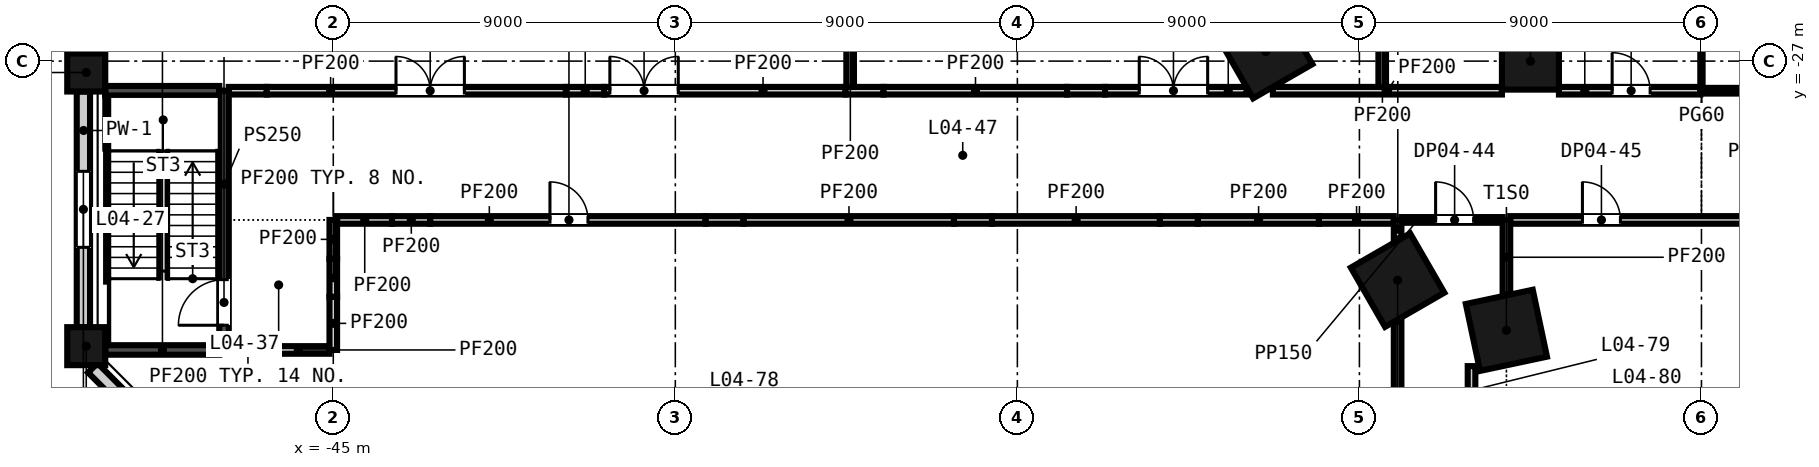
"""IFC4 building model, lengths in metres.
Left out: names, types, materials, properties, quantities, classifications, styles, units other than length and angle.
Written with IfcOpenShell. Run it as: python <this file> out.ifc"""

import sys

from ifc_helpers import new_model, si_unit, direction, frame, frame_2d, origin, origin_2d, place, context, subcontext, project, spatial, rectangle, extrude, element, fill, save


model = new_model("IFC4")
c1 = context("Model", 3, precision=1e-05, world=origin(), true_north=direction((0.0, 1.0)))
c2 = subcontext(c1, "Body", "Model", "MODEL_VIEW")
j1 = project(units=[si_unit("LENGTHUNIT", "METRE"), si_unit("PLANEANGLEUNIT", "RADIAN")], contexts=[c1])
p1 = place(None, origin())
s1 = spatial("IfcSite", under=j1, at=p1, CompositionType="ELEMENT")
p2 = place(p1, origin())
s2 = spatial("IfcBuilding", under=s1, at=p2, CompositionType="ELEMENT")
p3 = place(p2, frame((0.0, 0.0, 27.0)))
s3 = spatial("IfcBuildingStorey", under=s2, at=p3, CompositionType="ELEMENT", Elevation=27.0)
for number, where, z_axis, x_axis in (
    (1, (-20.467, -26.75, -0.3), (0.0, 0.0, 1.0), (0.5, -0.866, 0.0)),
    (2, (-16.995, -32.763, -0.3), (0.0, 0.0, 1.0), (0.5, -0.866, 0.0)),
    (3, (-14.132, -34.084, -0.3), (0.0, 0.0, 1.0), (0.978, 0.208, 0.0)),
):
    element("IfcColumn", number, at=place(p3, frame(where, z_axis=z_axis, x_axis=x_axis)), inside=s3, PredefinedType="COLUMN", context=c2, shape_type="SweptSolid", body=[
        extrude(rectangle(XDim=1.8, YDim=1.8, at=origin_2d()), origin(), (0.0, 0.0, 1.0), 4.5),
    ])
p4 = place(p3, frame((-13.5, -27.0, -0.3), z_axis=(0.0, 0.0, 1.0), x_axis=(1.0, 0.0, 0.0)))
e4 = element("IfcColumn", 4, at=p4, inside=s3, PredefinedType="COLUMN", context=c2, shape_type="SweptSolid", body=[
    extrude(rectangle(XDim=1.5, YDim=1.5, at=origin_2d()), origin(), (0.0, 0.0, 1.0), 4.5),
])
for number, where, z_axis, x_axis in (
    (5, (-51.5, -34.5, -0.3), (0.0, 0.0, 1.0), (0.0, -1.0, 0.0)),
    (6, (-51.5, -27.3, -0.3), (0.0, 0.0, 1.0), (0.0, 1.0, 0.0)),
):
    element("IfcColumn", number, at=place(p3, frame(where, z_axis=z_axis, x_axis=x_axis)), inside=s3, PredefinedType="COLUMN", context=c2, shape_type="SweptSolid", body=[
        extrude(rectangle(XDim=1.0, YDim=1.0, at=origin_2d()), origin(), (0.0, 0.0, 1.0), 4.5),
    ])
p5 = place(p3, frame((-51.575, -9.2, -0.3), z_axis=(0.0, 0.0, 1.0), x_axis=(0.0, -1.0, 0.0)))
e7 = element("IfcWall", 7, at=p5, inside=s3, PredefinedType="SOLIDWALL", context=c2, shape_type="SweptSolid", body=[
    extrude(rectangle(XDim=17.6, YDim=0.35, at=frame_2d((8.8, 0.0))), origin(), (0.0, 0.0, 1.0), 3.6),
])
p6 = place(p3, frame((-51.575, -27.8, -0.3), z_axis=(0.0, 0.0, 1.0), x_axis=(0.0, -1.0, 0.0)))
e8 = element("IfcWall", 8, at=p6, inside=s3, PredefinedType="SOLIDWALL", context=c2, shape_type="SweptSolid", body=[
    extrude(rectangle(XDim=6.2, YDim=0.35, at=frame_2d((3.1, 0.0))), origin(), (0.0, 0.0, 1.0), 3.6),
])
p7 = place(p6, frame((2.1, 0.0, 1.2)))
e9 = element("IfcOpeningElement", 9, at=p7, cuts=e8, PredefinedType="OPENING", context=c2, shape_type="SweptSolid", body=[
    extrude(rectangle(XDim=2.0, YDim=2.35, at=frame_2d((1.0, 1.175))), frame((0.0, 0.185, 0.0), z_axis=(0.0, -1.0, 0.0), x_axis=(1.0, 0.0, 0.0)), (0.0, 0.0, 1.0), 0.37),
])
p8 = place(p3, frame((-51.327, -35.072, -0.3), z_axis=(0.0, 0.0, 1.0), x_axis=(0.707106781187, -0.707106781187, 0.0)))
e10 = element("IfcWall", 10, at=p8, inside=s3, PredefinedType="SOLIDWALL", context=c2, shape_type="SweptSolid", body=[
    extrude(rectangle(XDim=7.433, YDim=0.35, at=frame_2d((3.716, 0.0))), origin(), (0.0, 0.0, 1.0), 3.6),
])
p9 = place(p3, frame((-51.0, -34.6, 0.0), z_axis=(0.0, 0.0, 1.0), x_axis=(1.0, 0.0, 0.0)))
e11 = element("IfcWall", 11, at=p9, inside=s3, PredefinedType="SHEAR", context=c2, shape_type="SweptSolid", body=[
    extrude(rectangle(XDim=3.0, YDim=0.25, at=frame_2d((1.5, 0.0))), origin(), (0.0, 0.0, 1.0), 4.2),
])
p10 = place(p3, frame((-47.75, -34.6, 0.0), z_axis=(0.0, 0.0, 1.0), x_axis=(1.0, 0.0, 0.0)))
e12 = element("IfcWall", 12, at=p10, inside=s3, PredefinedType="PARTITIONING", context=c2, shape_type="SweptSolid", body=[
    extrude(rectangle(XDim=1.0, YDim=0.2, at=frame_2d((0.5, 0.0))), origin(), (0.0, 0.0, 1.0), 3.111),
])
p11 = place(p3, frame((-46.75, -34.6, 0.0), z_axis=(0.0, 0.0, 1.0), x_axis=(1.0, 0.0, 0.0)))
e13 = element("IfcWall", 13, at=p11, inside=s3, PredefinedType="PARTITIONING", context=c2, shape_type="SweptSolid", body=[
    extrude(rectangle(XDim=1.65, YDim=0.2, at=frame_2d((0.825, 0.0))), origin(), (0.0, 0.0, 1.0), 4.2),
])
p12 = place(p3, frame((-44.9, -31.179, 0.0), z_axis=(0.0, 0.0, 1.0), x_axis=(1.0, 0.0, 0.0)))
e14 = element("IfcWall", 14, at=p12, inside=s3, PredefinedType="PARTITIONING", context=c2, shape_type="SweptSolid", body=[
    extrude(rectangle(XDim=1.445, YDim=0.2, at=frame_2d((0.723, 0.0))), origin(), (0.0, 0.0, 1.0), 4.2),
])
p13 = place(p3, frame((-43.455, -31.179, 0.0), z_axis=(0.0, 0.0, 1.0), x_axis=(1.0, 0.0, 0.0)))
e15 = element("IfcWall", 15, at=p13, inside=s3, PredefinedType="PARTITIONING", context=c2, shape_type="SweptSolid", body=[
    extrude(rectangle(XDim=1.006, YDim=0.2, at=frame_2d((0.503, 0.0))), origin(), (0.0, 0.0, 1.0), 3.111),
])
p14 = place(p3, frame((-42.449, -31.179, 0.0), z_axis=(0.0, 0.0, 1.0), x_axis=(1.0, 0.0, 0.0)))
e16 = element("IfcWall", 16, at=p14, inside=s3, PredefinedType="PARTITIONING", context=c2, shape_type="SweptSolid", body=[
    extrude(rectangle(XDim=7.245, YDim=0.2, at=frame_2d((3.623, 0.0))), origin(), (0.0, 0.0, 1.0), 4.2),
])
p15 = place(p14, frame((3.15, 0.0, 0.0)))
e17 = element("IfcOpeningElement", 17, at=p15, cuts=e16, PredefinedType="OPENING", context=c2, shape_type="SweptSolid", body=[
    extrude(rectangle(XDim=1.0, YDim=2.1, at=frame_2d((0.5, 1.05))), frame((0.0, 0.11, 0.0), z_axis=(0.0, -1.0, 0.0), x_axis=(1.0, 0.0, 0.0)), (0.0, 0.0, 1.0), 0.22),
])
p16 = place(p3, frame((-35.204, -31.179, 0.0), z_axis=(0.0, 0.0, 1.0), x_axis=(1.0, 0.0, 0.0)))
e18 = element("IfcWall", 18, at=p16, inside=s3, PredefinedType="PARTITIONING", context=c2, shape_type="SweptSolid", body=[
    extrude(rectangle(XDim=1.0, YDim=0.2, at=frame_2d((0.5, 0.0))), origin(), (0.0, 0.0, 1.0), 3.111),
])
p17 = place(p3, frame((-34.204, -31.179, 0.0), z_axis=(0.0, 0.0, 1.0), x_axis=(1.0, 0.0, 0.0)))
e19 = element("IfcWall", 19, at=p17, inside=s3, PredefinedType="PARTITIONING", context=c2, shape_type="SweptSolid", body=[
    extrude(rectangle(XDim=5.536, YDim=0.2, at=frame_2d((2.768, 0.0))), origin(), (0.0, 0.0, 1.0), 4.2),
])
p18 = place(p3, frame((-28.668, -31.179, 0.0), z_axis=(0.0, 0.0, 1.0), x_axis=(1.0, 0.0, 0.0)))
e20 = element("IfcWall", 20, at=p18, inside=s3, PredefinedType="PARTITIONING", context=c2, shape_type="SweptSolid", body=[
    extrude(rectangle(XDim=1.0, YDim=0.2, at=frame_2d((0.5, 0.0))), origin(), (0.0, 0.0, 1.0), 3.286),
])
p19 = place(p3, frame((-27.668, -31.179, 0.0), z_axis=(0.0, 0.0, 1.0), x_axis=(1.0, 0.0, 0.0)))
e21 = element("IfcWall", 21, at=p19, inside=s3, PredefinedType="PARTITIONING", context=c2, shape_type="SweptSolid", body=[
    extrude(rectangle(XDim=4.418, YDim=0.2, at=frame_2d((2.209, 0.0))), origin(), (0.0, 0.0, 1.0), 4.2),
])
p20 = place(p3, frame((-23.25, -31.179, 0.0), z_axis=(0.0, 0.0, 1.0), x_axis=(1.0, 0.0, 0.0)))
e22 = element("IfcWall", 22, at=p20, inside=s3, PredefinedType="PARTITIONING", context=c2, shape_type="SweptSolid", body=[
    extrude(rectangle(XDim=1.0, YDim=0.2, at=frame_2d((0.5, 0.0))), origin(), (0.0, 0.0, 1.0), 3.441),
])
p21 = place(p3, frame((-22.25, -31.179, 0.0), z_axis=(0.0, 0.0, 1.0), x_axis=(1.0, 0.0, 0.0)))
e23 = element("IfcWall", 23, at=p21, inside=s3, PredefinedType="PARTITIONING", context=c2, shape_type="SweptSolid", body=[
    extrude(rectangle(XDim=3.185, YDim=0.2, at=frame_2d((1.593, 0.0))), origin(), (0.0, 0.0, 1.0), 4.2),
])
p22 = place(p3, frame((-19.065, -31.179, 0.0), z_axis=(0.0, 0.0, 1.0), x_axis=(1.0, 0.0, 0.0)))
e24 = element("IfcWall", 24, at=p22, inside=s3, PredefinedType="PARTITIONING", context=c2, shape_type="SweptSolid", body=[
    extrude(rectangle(XDim=1.97, YDim=0.2, at=frame_2d((0.985, 0.0))), origin(), (0.0, 0.0, 1.0), 3.2),
])
p23 = place(p3, frame((-16.895, -31.179, 0.0), z_axis=(0.0, 0.0, 1.0), x_axis=(1.0, 0.0, 0.0)))
e25 = element("IfcWall", 25, at=p23, inside=s3, PredefinedType="PARTITIONING", context=c2, shape_type="SweptSolid", body=[
    extrude(rectangle(XDim=2.663, YDim=0.15, at=frame_2d((1.332, 0.0))), origin(), (0.0, 0.0, 1.0), 4.2),
])
p24 = place(p23, frame((0.9, 0.0, 0.0)))
e26 = element("IfcOpeningElement", 26, at=p24, cuts=e25, PredefinedType="OPENING", context=c2, shape_type="SweptSolid", body=[
    extrude(rectangle(XDim=1.0, YDim=2.1, at=frame_2d((0.5, 1.05))), frame((0.0, 0.085, 0.0), z_axis=(0.0, -1.0, 0.0), x_axis=(1.0, 0.0, 0.0)), (0.0, 0.0, 1.0), 0.17),
])
p25 = place(p3, frame((-14.032, -31.179, 0.0), z_axis=(0.0, 0.0, 1.0), x_axis=(1.0, 0.0, 0.0)))
e27 = element("IfcWall", 27, at=p25, inside=s3, PredefinedType="PARTITIONING", context=c2, shape_type="SweptSolid", body=[
    extrude(rectangle(XDim=13.566, YDim=0.2, at=frame_2d((6.783, 0.0))), origin(), (0.0, 0.0, 1.0), 4.2),
])
p26 = place(p25, frame((1.9, 0.0, 0.0)))
e28 = element("IfcOpeningElement", 28, at=p26, cuts=e27, PredefinedType="OPENING", context=c2, shape_type="SweptSolid", body=[
    extrude(rectangle(XDim=1.0, YDim=2.1, at=frame_2d((0.5, 1.05))), frame((0.0, 0.11, 0.0), z_axis=(0.0, -1.0, 0.0), x_axis=(1.0, 0.0, 0.0)), (0.0, 0.0, 1.0), 0.22),
])
p27 = place(p25, frame((10.071, 0.0, 0.0)))
e29 = element("IfcOpeningElement", 29, at=p27, cuts=e27, PredefinedType="OPENING", context=c2, shape_type="SweptSolid", body=[
    extrude(rectangle(XDim=1.0, YDim=2.1, at=frame_2d((0.5, 1.05))), frame((0.0, 0.11, 0.0), z_axis=(0.0, -1.0, 0.0), x_axis=(1.0, 0.0, 0.0)), (0.0, 0.0, 1.0), 0.22),
])
p28 = place(p3, frame((-51.0, -27.779, 0.0), z_axis=(0.0, 0.0, 1.0), x_axis=(1.0, 0.0, 0.0)))
e30 = element("IfcWall", 30, at=p28, inside=s3, PredefinedType="SHEAR", context=c2, shape_type="SweptSolid", body=[
    extrude(rectangle(XDim=3.0, YDim=0.25, at=frame_2d((1.5, 0.0))), origin(), (0.0, 0.0, 1.0), 4.2),
])
p29 = place(p3, frame((-47.75, -27.779, 0.0), z_axis=(0.0, 0.0, 1.0), x_axis=(1.0, 0.0, 0.0)))
e31 = element("IfcWall", 31, at=p29, inside=s3, PredefinedType="PARTITIONING", context=c2, shape_type="SweptSolid", body=[
    extrude(rectangle(XDim=1.0, YDim=0.2, at=frame_2d((0.5, 0.0))), origin(), (0.0, 0.0, 1.0), 3.667),
])
p30 = place(p3, frame((-46.75, -27.779, 0.0), z_axis=(0.0, 0.0, 1.0), x_axis=(1.0, 0.0, 0.0)))
e32 = element("IfcWall", 32, at=p30, inside=s3, PredefinedType="PARTITIONING", context=c2, shape_type="SweptSolid", body=[
    extrude(rectangle(XDim=7.872, YDim=0.2, at=frame_2d((3.936, 0.0))), origin(), (0.0, 0.0, 1.0), 4.2),
])
p31 = place(p30, frame((3.4, 0.0, 0.0)))
e33 = element("IfcOpeningElement", 33, at=p31, cuts=e32, PredefinedType="OPENING", context=c2, shape_type="SweptSolid", body=[
    extrude(rectangle(XDim=1.8, YDim=2.4, at=frame_2d((0.9, 1.2))), frame((0.0, 0.11, 0.0), z_axis=(0.0, -1.0, 0.0), x_axis=(1.0, 0.0, 0.0)), (0.0, 0.0, 1.0), 0.22),
])
p32 = place(p3, frame((-38.878, -27.779, 0.0), z_axis=(0.0, 0.0, 1.0), x_axis=(1.0, 0.0, 0.0)))
e34 = element("IfcWall", 34, at=p32, inside=s3, PredefinedType="PARTITIONING", context=c2, shape_type="SweptSolid", body=[
    extrude(rectangle(XDim=1.006, YDim=0.2, at=frame_2d((0.503, 0.0))), origin(), (0.0, 0.0, 1.0), 3.111),
])
p33 = place(p3, frame((-37.872, -27.779, 0.0), z_axis=(0.0, 0.0, 1.0), x_axis=(1.0, 0.0, 0.0)))
e35 = element("IfcWall", 35, at=p33, inside=s3, PredefinedType="PARTITIONING", context=c2, shape_type="SweptSolid", body=[
    extrude(rectangle(XDim=6.351, YDim=0.2, at=frame_2d((3.176, 0.0))), origin(), (0.0, 0.0, 1.0), 4.2),
])
p34 = place(p33, frame((0.15, 0.0, 0.0)))
e36 = element("IfcOpeningElement", 36, at=p34, cuts=e35, PredefinedType="OPENING", context=c2, shape_type="SweptSolid", body=[
    extrude(rectangle(XDim=1.8, YDim=2.4, at=frame_2d((0.9, 1.2))), frame((0.0, 0.11, 0.0), z_axis=(0.0, -1.0, 0.0), x_axis=(1.0, 0.0, 0.0)), (0.0, 0.0, 1.0), 0.22),
])
p35 = place(p3, frame((-31.521, -27.779, 0.0), z_axis=(0.0, 0.0, 1.0), x_axis=(1.0, 0.0, 0.0)))
e37 = element("IfcWall", 37, at=p35, inside=s3, PredefinedType="PARTITIONING", context=c2, shape_type="SweptSolid", body=[
    extrude(rectangle(XDim=1.0, YDim=0.2, at=frame_2d((0.5, 0.0))), origin(), (0.0, 0.0, 1.0), 3.111),
])
p36 = place(p3, frame((-30.521, -27.779, 0.0), z_axis=(0.0, 0.0, 1.0), x_axis=(1.0, 0.0, 0.0)))
e38 = element("IfcWall", 38, at=p36, inside=s3, PredefinedType="PARTITIONING", context=c2, shape_type="SweptSolid", body=[
    extrude(rectangle(XDim=4.828, YDim=0.2, at=frame_2d((2.414, 0.0))), origin(), (0.0, 0.0, 1.0), 4.2),
])
p37 = place(p3, frame((-25.693, -27.779, 0.0), z_axis=(0.0, 0.0, 1.0), x_axis=(1.0, 0.0, 0.0)))
e39 = element("IfcWall", 39, at=p37, inside=s3, PredefinedType="PARTITIONING", context=c2, shape_type="SweptSolid", body=[
    extrude(rectangle(XDim=1.0, YDim=0.2, at=frame_2d((0.5, 0.0))), origin(), (0.0, 0.0, 1.0), 3.286),
])
p38 = place(p3, frame((-24.693, -27.779, 0.0), z_axis=(0.0, 0.0, 1.0), x_axis=(1.0, 0.0, 0.0)))
e40 = element("IfcWall", 40, at=p38, inside=s3, PredefinedType="PARTITIONING", context=c2, shape_type="SweptSolid", body=[
    extrude(rectangle(XDim=3.723, YDim=0.2, at=frame_2d((1.861, 0.0))), origin(), (0.0, 0.0, 1.0), 4.2),
])
p39 = place(p38, frame((0.9, 0.0, 0.0)))
e41 = element("IfcOpeningElement", 41, at=p39, cuts=e40, PredefinedType="OPENING", context=c2, shape_type="SweptSolid", body=[
    extrude(rectangle(XDim=1.8, YDim=2.4, at=frame_2d((0.9, 1.2))), frame((0.0, 0.11, 0.0), z_axis=(0.0, -1.0, 0.0), x_axis=(1.0, 0.0, 0.0)), (0.0, 0.0, 1.0), 0.22),
])
p40 = place(p3, frame((-20.276, -27.779, 0.0), z_axis=(0.0, 0.0, 1.0), x_axis=(1.0, 0.0, 0.0)))
e42 = element("IfcWall", 42, at=p40, inside=s3, PredefinedType="PARTITIONING", context=c2, shape_type="SweptSolid", body=[
    extrude(rectangle(XDim=6.026, YDim=0.2, at=frame_2d((3.013, 0.0))), origin(), (0.0, 0.0, 1.0), 4.2),
])
p41 = place(p3, frame((-12.75, -27.779, 0.0), z_axis=(0.0, 0.0, 1.0), x_axis=(1.0, 0.0, 0.0)))
e43 = element("IfcWall", 43, at=p41, inside=s3, PredefinedType="PARTITIONING", context=c2, shape_type="SweptSolid", body=[
    extrude(rectangle(XDim=3.72, YDim=0.2, at=frame_2d((1.86, 0.0))), origin(), (0.0, 0.0, 1.0), 4.2),
])
p42 = place(p41, frame((1.4, 0.0, 0.0)))
e44 = element("IfcOpeningElement", 44, at=p42, cuts=e43, PredefinedType="OPENING", context=c2, shape_type="SweptSolid", body=[
    extrude(rectangle(XDim=1.0, YDim=2.1, at=frame_2d((0.5, 1.05))), frame((0.0, 0.11, 0.0), z_axis=(0.0, -1.0, 0.0), x_axis=(1.0, 0.0, 0.0)), (0.0, 0.0, 1.0), 0.22),
])
p43 = place(p3, frame((-8.97, -27.779, 0.0), z_axis=(0.0, 0.0, 1.0), x_axis=(1.0, 0.0, 0.0)))
e45 = element("IfcWall", 45, at=p43, inside=s3, PredefinedType="PARTITIONING", context=c2, shape_type="SweptSolid", body=[
    extrude(rectangle(XDim=8.22, YDim=0.15, at=frame_2d((4.11, 0.0))), origin(), (0.0, 0.0, 1.0), 4.2),
])
p44 = place(p3, frame((-47.875, -34.6, 0.0), z_axis=(0.0, 0.0, 1.0), x_axis=(0.0, 1.0, 0.0)))
e46 = element("IfcWall", 46, at=p44, inside=s3, PredefinedType="SHEAR", context=c2, shape_type="SweptSolid", body=[
    extrude(rectangle(XDim=6.821, YDim=0.25, at=frame_2d((3.411, 0.0))), origin(), (0.0, 0.0, 1.0), 4.2),
])
p45 = place(p44, frame((0.65, 0.0, 0.0)))
e47 = element("IfcOpeningElement", 47, at=p45, cuts=e46, PredefinedType="OPENING", context=c2, shape_type="SweptSolid", body=[
    extrude(rectangle(XDim=1.2, YDim=2.1, at=frame_2d((0.6, 1.05))), frame((0.0, 0.135, 0.0), z_axis=(0.0, -1.0, 0.0), x_axis=(1.0, 0.0, 0.0)), (0.0, 0.0, 1.0), 0.27),
])
p46 = place(p3, frame((-45.0, -34.6, 0.0), z_axis=(0.0, 0.0, 1.0), x_axis=(0.0, 1.0, 0.0)))
e48 = element("IfcWall", 48, at=p46, inside=s3, PredefinedType="PARTITIONING", context=c2, shape_type="SweptSolid", body=[
    extrude(rectangle(XDim=1.399, YDim=0.2, at=frame_2d((0.7, 0.0))), origin(), (0.0, 0.0, 1.0), 4.2),
])
p47 = place(p3, frame((-45.0, -33.201, 0.0), z_axis=(0.0, 0.0, 1.0), x_axis=(0.0, 1.0, 0.0)))
e49 = element("IfcWall", 49, at=p47, inside=s3, PredefinedType="PARTITIONING", context=c2, shape_type="SweptSolid", body=[
    extrude(rectangle(XDim=1.0, YDim=0.2, at=frame_2d((0.5, 0.0))), origin(), (0.0, 0.0, 1.0), 3.111),
])
p48 = place(p3, frame((-45.0, -32.201, 0.0), z_axis=(0.0, 0.0, 1.0), x_axis=(0.0, 1.0, 0.0)))
e50 = element("IfcWall", 50, at=p48, inside=s3, PredefinedType="PARTITIONING", context=c2, shape_type="SweptSolid", body=[
    extrude(rectangle(XDim=1.022, YDim=0.2, at=frame_2d((0.511, 0.0))), origin(), (0.0, 0.0, 1.0), 4.2),
])
p49 = place(p3, frame((-31.4, -27.679, 0.0), z_axis=(0.0, 0.0, 1.0), x_axis=(0.0, 1.0, 0.0)))
e51 = element("IfcWall", 51, at=p49, inside=s3, PredefinedType="PARTITIONING", context=c2, shape_type="SweptSolid", body=[
    extrude(rectangle(XDim=4.582, YDim=0.2, at=frame_2d((2.291, 0.0))), origin(), (0.0, 0.0, 1.0), 4.2),
])
p50 = place(p3, frame((-17.4, -27.679, 0.0), z_axis=(0.0, 0.0, 1.0), x_axis=(0.0, 1.0, 0.0)))
e52 = element("IfcWall", 52, at=p50, inside=s3, PredefinedType="PARTITIONING", context=c2, shape_type="SweptSolid", body=[
    extrude(rectangle(XDim=12.09, YDim=0.2, at=frame_2d((6.045, 0.0))), origin(), (0.0, 0.0, 1.0), 4.2),
])
p51 = place(p3, frame((-16.995, -37.896, 0.0), z_axis=(0.0, 0.0, 1.0), x_axis=(0.0, 1.0, 0.0)))
e53 = element("IfcWall", 53, at=p51, inside=s3, PredefinedType="PARTITIONING", context=c2, shape_type="SweptSolid", body=[
    extrude(rectangle(XDim=4.036, YDim=0.2, at=frame_2d((2.018, 0.0))), origin(), (0.0, 0.0, 1.0), 4.2),
])
p52 = place(p3, frame((-16.995, -31.666, 0.0), z_axis=(0.0, 0.0, 1.0), x_axis=(0.0, 1.0, 0.0)))
e54 = element("IfcWall", 54, at=p52, inside=s3, PredefinedType="PARTITIONING", context=c2, shape_type="SweptSolid", body=[
    extrude(rectangle(XDim=0.487, YDim=0.2, at=frame_2d((0.244, 0.0))), origin(), (0.0, 0.0, 1.0), 4.2),
])
p53 = place(p3, frame((-15.05, -40.4, 0.0), z_axis=(0.0, 0.0, 1.0), x_axis=(0.0, 1.0, 0.0)))
e55 = element("IfcWall", 55, at=p53, inside=s3, PredefinedType="PARTITIONING", context=c2, shape_type="SweptSolid", body=[
    extrude(rectangle(XDim=5.375, YDim=0.2, at=frame_2d((2.688, 0.0))), origin(), (0.0, 0.0, 1.0), 4.2),
])
p54 = place(p3, frame((-14.132, -33.142, 0.0), z_axis=(0.0, 0.0, 1.0), x_axis=(0.0, 1.0, 0.0)))
e56 = element("IfcWall", 56, at=p54, inside=s3, PredefinedType="PARTITIONING", context=c2, shape_type="SweptSolid", body=[
    extrude(rectangle(XDim=1.963, YDim=0.2, at=frame_2d((0.982, 0.0))), origin(), (0.0, 0.0, 1.0), 4.2),
])
p55 = place(p3, frame((-9.0, -27.778, 0.0), z_axis=(0.0, 0.0, 1.0), x_axis=(0.0, 1.0, 0.0)))
e57 = element("IfcWall", 57, at=p55, inside=s3, PredefinedType="PARTITIONING", context=c2, shape_type="SweptSolid", body=[
    extrude(rectangle(XDim=12.288, YDim=0.06, at=frame_2d((6.144, 0.0))), origin(), (0.0, 0.0, 1.0), 4.2),
])
p56 = place(p7, origin())
e58 = element("IfcWindow", 58, at=p56, inside=s3, PartitioningType="SINGLE_PANEL", PredefinedType="WINDOW", context=c2, shape_type="SweptSolid", body=[
    extrude(rectangle(XDim=2.0, YDim=2.35, at=frame_2d((1.0, 1.175))), frame((0.0, 0.03, 0.0), z_axis=(0.0, -1.0, 0.0), x_axis=(1.0, 0.0, 0.0)), (0.0, 0.0, 1.0), 0.06),
])
fill(e9, e58)
p57 = place(p45, origin())
e59 = element("IfcDoor", 59, at=p57, inside=s3, OperationType="SINGLE_SWING_LEFT", PredefinedType="DOOR", context=c2, shape_type="SweptSolid", body=[
    extrude(rectangle(XDim=1.2, YDim=2.1, at=frame_2d((0.6, 1.05))), frame((0.0, 0.025, 0.0), z_axis=(0.0, -1.0, 0.0), x_axis=(1.0, 0.0, 0.0)), (0.0, 0.0, 1.0), 0.05),
])
fill(e47, e59)
p58 = place(p31, origin())
e60 = element("IfcDoor", 60, at=p58, inside=s3, OperationType="SINGLE_SWING_LEFT", PredefinedType="DOOR", context=c2, shape_type="SweptSolid", body=[
    extrude(rectangle(XDim=1.8, YDim=2.4, at=frame_2d((0.9, 1.2))), frame((0.0, 0.025, 0.0), z_axis=(0.0, -1.0, 0.0), x_axis=(1.0, 0.0, 0.0)), (0.0, 0.0, 1.0), 0.05),
])
fill(e33, e60)
p59 = place(p34, origin())
e61 = element("IfcDoor", 61, at=p59, inside=s3, OperationType="SINGLE_SWING_LEFT", PredefinedType="DOOR", context=c2, shape_type="SweptSolid", body=[
    extrude(rectangle(XDim=1.8, YDim=2.4, at=frame_2d((0.9, 1.2))), frame((0.0, 0.025, 0.0), z_axis=(0.0, -1.0, 0.0), x_axis=(1.0, 0.0, 0.0)), (0.0, 0.0, 1.0), 0.05),
])
fill(e36, e61)
p60 = place(p39, origin())
e62 = element("IfcDoor", 62, at=p60, inside=s3, OperationType="SINGLE_SWING_LEFT", PredefinedType="DOOR", context=c2, shape_type="SweptSolid", body=[
    extrude(rectangle(XDim=1.8, YDim=2.4, at=frame_2d((0.9, 1.2))), frame((0.0, 0.025, 0.0), z_axis=(0.0, -1.0, 0.0), x_axis=(1.0, 0.0, 0.0)), (0.0, 0.0, 1.0), 0.05),
])
fill(e41, e62)
p61 = place(p42, origin())
e63 = element("IfcDoor", 63, at=p61, inside=s3, OperationType="SINGLE_SWING_LEFT", PredefinedType="DOOR", context=c2, shape_type="SweptSolid", body=[
    extrude(rectangle(XDim=1.0, YDim=2.1, at=frame_2d((0.5, 1.05))), frame((0.0, 0.025, 0.0), z_axis=(0.0, -1.0, 0.0), x_axis=(1.0, 0.0, 0.0)), (0.0, 0.0, 1.0), 0.05),
])
fill(e44, e63)
p62 = place(p15, origin())
e64 = element("IfcDoor", 64, at=p62, inside=s3, OperationType="SINGLE_SWING_LEFT", PredefinedType="DOOR", context=c2, shape_type="SweptSolid", body=[
    extrude(rectangle(XDim=1.0, YDim=2.1, at=frame_2d((0.5, 1.05))), frame((0.0, 0.025, 0.0), z_axis=(0.0, -1.0, 0.0), x_axis=(1.0, 0.0, 0.0)), (0.0, 0.0, 1.0), 0.05),
])
fill(e17, e64)
p63 = place(p24, origin())
e65 = element("IfcDoor", 65, at=p63, inside=s3, OperationType="SINGLE_SWING_LEFT", PredefinedType="DOOR", context=c2, shape_type="SweptSolid", body=[
    extrude(rectangle(XDim=1.0, YDim=2.1, at=frame_2d((0.5, 1.05))), frame((0.0, 0.025, 0.0), z_axis=(0.0, -1.0, 0.0), x_axis=(1.0, 0.0, 0.0)), (0.0, 0.0, 1.0), 0.05),
])
fill(e26, e65)
p64 = place(p26, origin())
e66 = element("IfcDoor", 66, at=p64, inside=s3, OperationType="SINGLE_SWING_LEFT", PredefinedType="DOOR", context=c2, shape_type="SweptSolid", body=[
    extrude(rectangle(XDim=1.0, YDim=2.1, at=frame_2d((0.5, 1.05))), frame((0.0, 0.025, 0.0), z_axis=(0.0, -1.0, 0.0), x_axis=(1.0, 0.0, 0.0)), (0.0, 0.0, 1.0), 0.05),
])
fill(e28, e66)
save(model, sys.argv[1])
